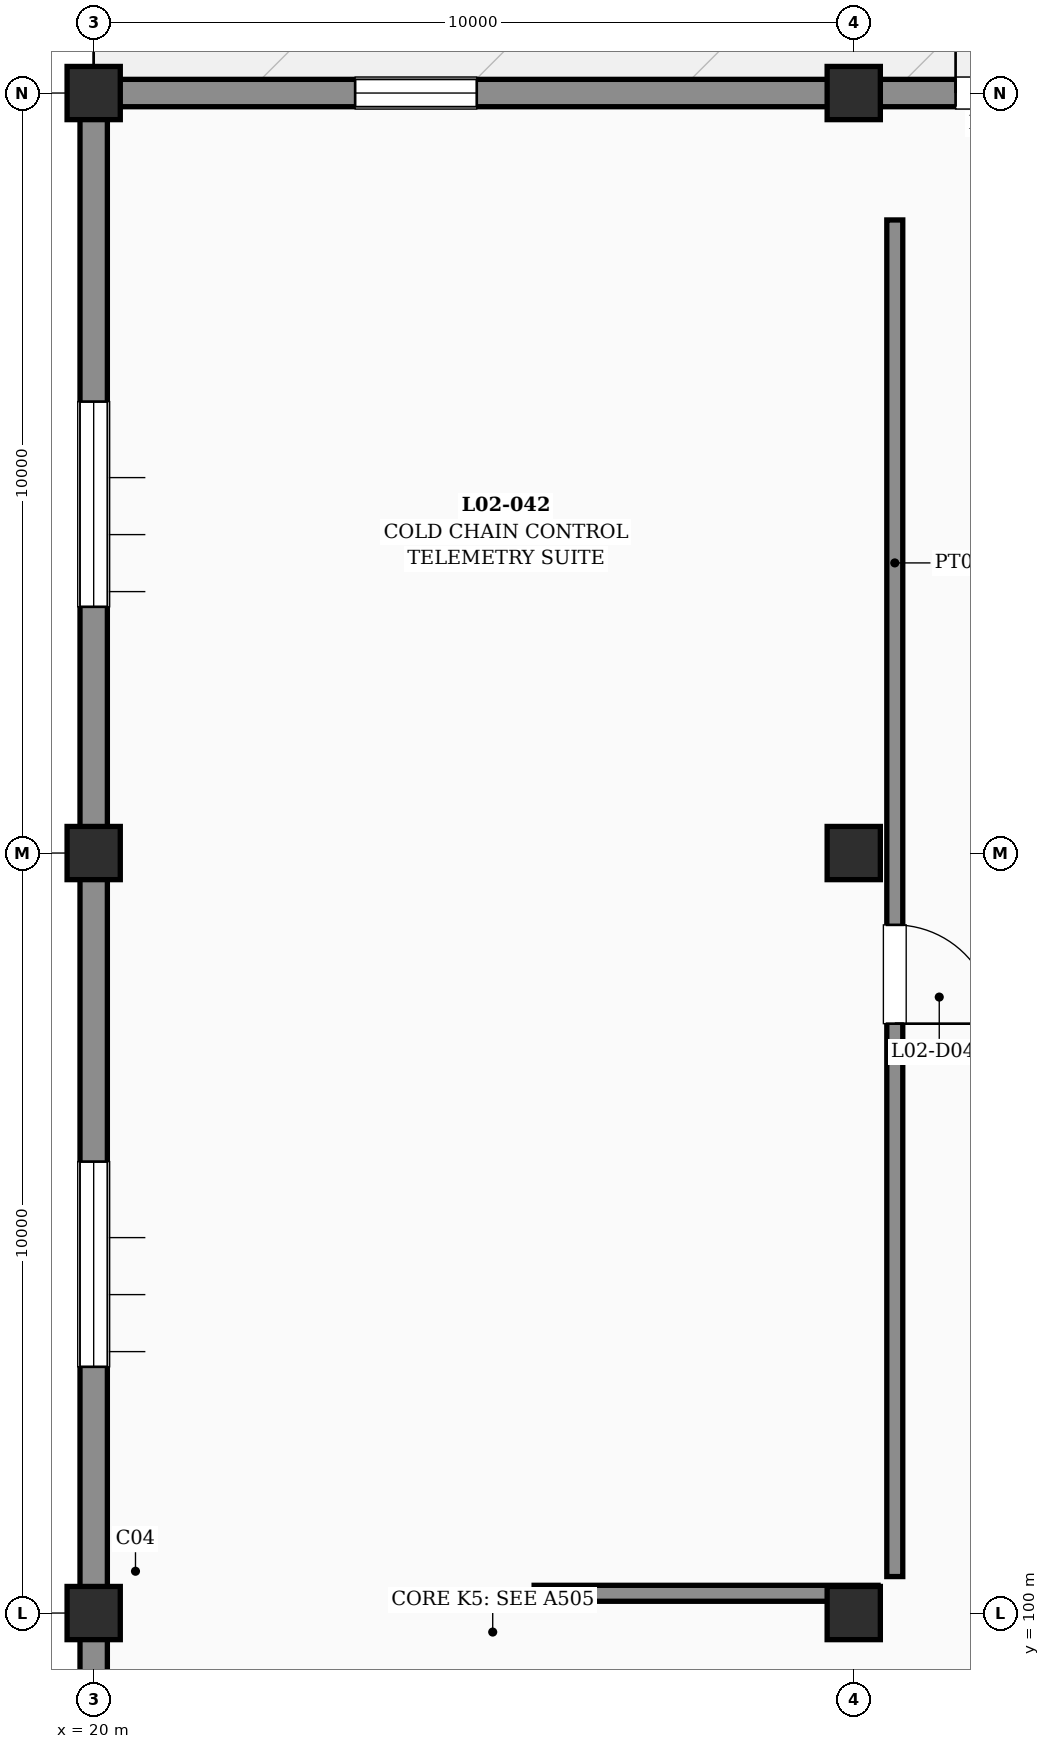
"""IFC4 building model, lengths in metres.
Left out: names, types, materials, properties, quantities, classifications, styles, units other than length and angle.
Written with IfcOpenShell. Run it as: python <this file> out.ifc"""

import sys

from ifc_helpers import new_model, si_unit, direction, frame, frame_2d, origin, origin_2d, place, context, subcontext, project, spatial, rectangle, extrude, element, fill, save


model = new_model("IFC4")
c1 = context("Model", 3, precision=1e-05, world=origin(), true_north=direction((0.0, 1.0)))
c2 = subcontext(c1, "Body", "Model", "MODEL_VIEW")
j1 = project(units=[si_unit("LENGTHUNIT", "METRE"), si_unit("PLANEANGLEUNIT", "RADIAN")], contexts=[c1])
p1 = place(None, origin())
s1 = spatial("IfcSite", under=j1, at=p1, CompositionType="ELEMENT")
p2 = place(p1, origin())
s2 = spatial("IfcBuilding", under=s1, at=p2, CompositionType="ELEMENT")
p3 = place(p2, frame((0.0, 0.0, 10.8)))
s3 = spatial("IfcBuildingStorey", under=s2, at=p3, CompositionType="ELEMENT", Elevation=10.8)
for number, where, z_axis, x_axis in (
    (1, (20.0, 100.0, 0.0), (0.0, 0.0, 1.0), (1.0, 0.0, 0.0)),
    (2, (20.0, 110.0, 0.0), (0.0, 0.0, 1.0), (1.0, 0.0, 0.0)),
    (3, (20.0, 120.0, 0.0), (0.0, 0.0, 1.0), (1.0, 0.0, 0.0)),
    (4, (30.0, 100.0, 0.0), (0.0, 0.0, 1.0), (1.0, 0.0, 0.0)),
    (5, (30.0, 110.0, 0.0), (0.0, 0.0, 1.0), (1.0, 0.0, 0.0)),
    (6, (30.0, 120.0, 0.0), (0.0, 0.0, 1.0), (1.0, 0.0, 0.0)),
):
    element("IfcColumn", number, at=place(p3, frame(where, z_axis=z_axis, x_axis=x_axis)), inside=s3, PredefinedType="COLUMN", context=c2, shape_type="SweptSolid", body=[
        extrude(rectangle(XDim=0.7, YDim=0.7, at=origin_2d()), origin(), (0.0, 0.0, 1.0), 4.2),
    ])
p4 = place(p3, frame((20.0, 90.24, 0.0), z_axis=(0.0, 0.0, 1.0), x_axis=(0.0, 1.0, 0.0)))
e7 = element("IfcWall", 7, at=p4, inside=s3, PredefinedType="SOLIDWALL", context=c2, shape_type="SweptSolid", body=[
    extrude(rectangle(XDim=9.52, YDim=0.36, at=frame_2d((4.76, 0.0))), origin(), (0.0, 0.0, 1.0), 3.08),
])
p5 = place(p4, frame((3.0, 0.0, 1.3)))
e8 = element("IfcOpeningElement", 8, at=p5, cuts=e7, PredefinedType="OPENING", context=c2, shape_type="SweptSolid", body=[
    extrude(rectangle(XDim=2.7, YDim=1.4, at=frame_2d((1.35, 0.7))), frame((0.0, 0.19, 0.0), z_axis=(0.0, -1.0, 0.0), x_axis=(1.0, 0.0, 0.0)), (0.0, 0.0, 1.0), 0.38),
])
p6 = place(p3, frame((20.0, 100.24, 0.0), z_axis=(0.0, 0.0, 1.0), x_axis=(0.0, 1.0, 0.0)))
e9 = element("IfcWall", 9, at=p6, inside=s3, PredefinedType="SOLIDWALL", context=c2, shape_type="SweptSolid", body=[
    extrude(rectangle(XDim=9.52, YDim=0.36, at=frame_2d((4.76, 0.0))), origin(), (0.0, 0.0, 1.0), 3.08),
])
p7 = place(p6, frame((3.0, 0.0, 1.3)))
e10 = element("IfcOpeningElement", 10, at=p7, cuts=e9, PredefinedType="OPENING", context=c2, shape_type="SweptSolid", body=[
    extrude(rectangle(XDim=2.7, YDim=1.4, at=frame_2d((1.35, 0.7))), frame((0.0, 0.19, 0.0), z_axis=(0.0, -1.0, 0.0), x_axis=(1.0, 0.0, 0.0)), (0.0, 0.0, 1.0), 0.38),
])
p8 = place(p3, frame((20.0, 110.24, 0.0), z_axis=(0.0, 0.0, 1.0), x_axis=(0.0, 1.0, 0.0)))
e11 = element("IfcWall", 11, at=p8, inside=s3, PredefinedType="SOLIDWALL", context=c2, shape_type="SweptSolid", body=[
    extrude(rectangle(XDim=9.52, YDim=0.36, at=frame_2d((4.76, 0.0))), origin(), (0.0, 0.0, 1.0), 3.08),
])
p9 = place(p8, frame((3.0, 0.0, 1.3)))
e12 = element("IfcOpeningElement", 12, at=p9, cuts=e11, PredefinedType="OPENING", context=c2, shape_type="SweptSolid", body=[
    extrude(rectangle(XDim=2.7, YDim=1.4, at=frame_2d((1.35, 0.7))), frame((0.0, 0.19, 0.0), z_axis=(0.0, -1.0, 0.0), x_axis=(1.0, 0.0, 0.0)), (0.0, 0.0, 1.0), 0.38),
])
p10 = place(p3, frame((20.24, 120.0, 0.0), z_axis=(0.0, 0.0, 1.0), x_axis=(1.0, 0.0, 0.0)))
e13 = element("IfcWall", 13, at=p10, inside=s3, PredefinedType="SOLIDWALL", context=c2, shape_type="SweptSolid", body=[
    extrude(rectangle(XDim=9.52, YDim=0.36, at=frame_2d((4.76, 0.0))), origin(), (0.0, 0.0, 1.0), 3.23),
])
p11 = place(p10, frame((3.2, 0.0, 1.1)))
e14 = element("IfcOpeningElement", 14, at=p11, cuts=e13, PredefinedType="OPENING", context=c2, shape_type="SweptSolid", body=[
    extrude(rectangle(XDim=1.6, YDim=1.5, at=frame_2d((0.8, 0.75))), frame((0.0, 0.19, 0.0), z_axis=(0.0, -1.0, 0.0), x_axis=(1.0, 0.0, 0.0)), (0.0, 0.0, 1.0), 0.38),
])
p12 = place(p3, frame((30.24, 120.0, 0.0), z_axis=(0.0, 0.0, 1.0), x_axis=(1.0, 0.0, 0.0)))
e15 = element("IfcWall", 15, at=p12, inside=s3, PredefinedType="SOLIDWALL", context=c2, shape_type="SweptSolid", body=[
    extrude(rectangle(XDim=9.52, YDim=0.36, at=frame_2d((4.76, 0.0))), origin(), (0.0, 0.0, 1.0), 3.23),
])
p13 = place(p12, frame((1.1, 0.0, 0.0)))
e16 = element("IfcOpeningElement", 16, at=p13, cuts=e15, PredefinedType="OPENING", context=c2, shape_type="SweptSolid", body=[
    extrude(rectangle(XDim=1.6, YDim=2.3, at=frame_2d((0.8, 1.15))), frame((0.0, 0.19, 0.0), z_axis=(0.0, -1.0, 0.0), x_axis=(1.0, 0.0, 0.0)), (0.0, 0.0, 1.0), 0.38),
])
p14 = place(p3, frame((30.54, 118.33, 0.0), z_axis=(0.0, 0.0, 1.0), x_axis=(0.0, -1.0, 0.0)))
e17 = element("IfcWall", 17, at=p14, inside=s3, PredefinedType="PARTITIONING", context=c2, shape_type="SweptSolid", body=[
    extrude(rectangle(XDim=17.85, YDim=0.21, at=frame_2d((8.925, 0.0))), origin(), (0.0, 0.0, 1.0), 3.23),
])
p15 = place(p14, frame((9.275, 0.0, 0.0)))
e18 = element("IfcOpeningElement", 18, at=p15, cuts=e17, PredefinedType="OPENING", context=c2, shape_type="SweptSolid", body=[
    extrude(rectangle(XDim=1.3, YDim=2.2, at=frame_2d((0.65, 1.1))), frame((0.0, 0.115, 0.0), z_axis=(0.0, -1.0, 0.0), x_axis=(1.0, 0.0, 0.0)), (0.0, 0.0, 1.0), 0.23),
])
p16 = place(p3, frame((30.32, 100.26, 0.0), z_axis=(0.0, 0.0, 1.0), x_axis=(-1.0, 0.0, 0.0)))
e19 = element("IfcWall", 19, at=p16, inside=s3, PredefinedType="PARTITIONING", context=c2, shape_type="SweptSolid", body=[
    extrude(rectangle(XDim=4.525, YDim=0.21, at=frame_2d((2.263, 0.0))), origin(), (0.0, 0.0, 1.0), 3.23),
])
p17 = place(p7, origin())
e20 = element("IfcWindow", 20, at=p17, inside=s3, PartitioningType="SINGLE_PANEL", PredefinedType="WINDOW", context=c2, shape_type="SweptSolid", body=[
    extrude(rectangle(XDim=2.7, YDim=1.4, at=frame_2d((1.35, 0.7))), frame((0.0, 0.03, 0.0), z_axis=(0.0, -1.0, 0.0), x_axis=(1.0, 0.0, 0.0)), (0.0, 0.0, 1.0), 0.06),
])
fill(e10, e20)
p18 = place(p9, origin())
e21 = element("IfcWindow", 21, at=p18, inside=s3, PartitioningType="SINGLE_PANEL", PredefinedType="WINDOW", context=c2, shape_type="SweptSolid", body=[
    extrude(rectangle(XDim=2.7, YDim=1.4, at=frame_2d((1.35, 0.7))), frame((0.0, 0.03, 0.0), z_axis=(0.0, -1.0, 0.0), x_axis=(1.0, 0.0, 0.0)), (0.0, 0.0, 1.0), 0.06),
])
fill(e12, e21)
p19 = place(p11, origin())
e22 = element("IfcWindow", 22, at=p19, inside=s3, PartitioningType="SINGLE_PANEL", PredefinedType="WINDOW", context=c2, shape_type="SweptSolid", body=[
    extrude(rectangle(XDim=1.6, YDim=1.5, at=frame_2d((0.8, 0.75))), frame((0.0, 0.03, 0.0), z_axis=(0.0, -1.0, 0.0), x_axis=(1.0, 0.0, 0.0)), (0.0, 0.0, 1.0), 0.06),
])
fill(e14, e22)
p20 = place(p13, origin())
e23 = element("IfcDoor", 23, at=p20, inside=s3, OperationType="DOUBLE_DOOR_SINGLE_SWING", PredefinedType="DOOR", context=c2, shape_type="SweptSolid", body=[
    extrude(rectangle(XDim=1.6, YDim=2.3, at=frame_2d((0.8, 1.15))), frame((0.0, 0.025, 0.0), z_axis=(0.0, -1.0, 0.0), x_axis=(1.0, 0.0, 0.0)), (0.0, 0.0, 1.0), 0.05),
])
fill(e16, e23)
p21 = place(p15, origin())
e24 = element("IfcDoor", 24, at=p21, inside=s3, OperationType="SINGLE_SWING_RIGHT", PredefinedType="DOOR", context=c2, shape_type="SweptSolid", body=[
    extrude(rectangle(XDim=1.3, YDim=2.2, at=frame_2d((0.65, 1.1))), frame((0.0, 0.025, 0.0), z_axis=(0.0, -1.0, 0.0), x_axis=(1.0, 0.0, 0.0)), (0.0, 0.0, 1.0), 0.05),
])
fill(e18, e24)
save(model, sys.argv[1])
